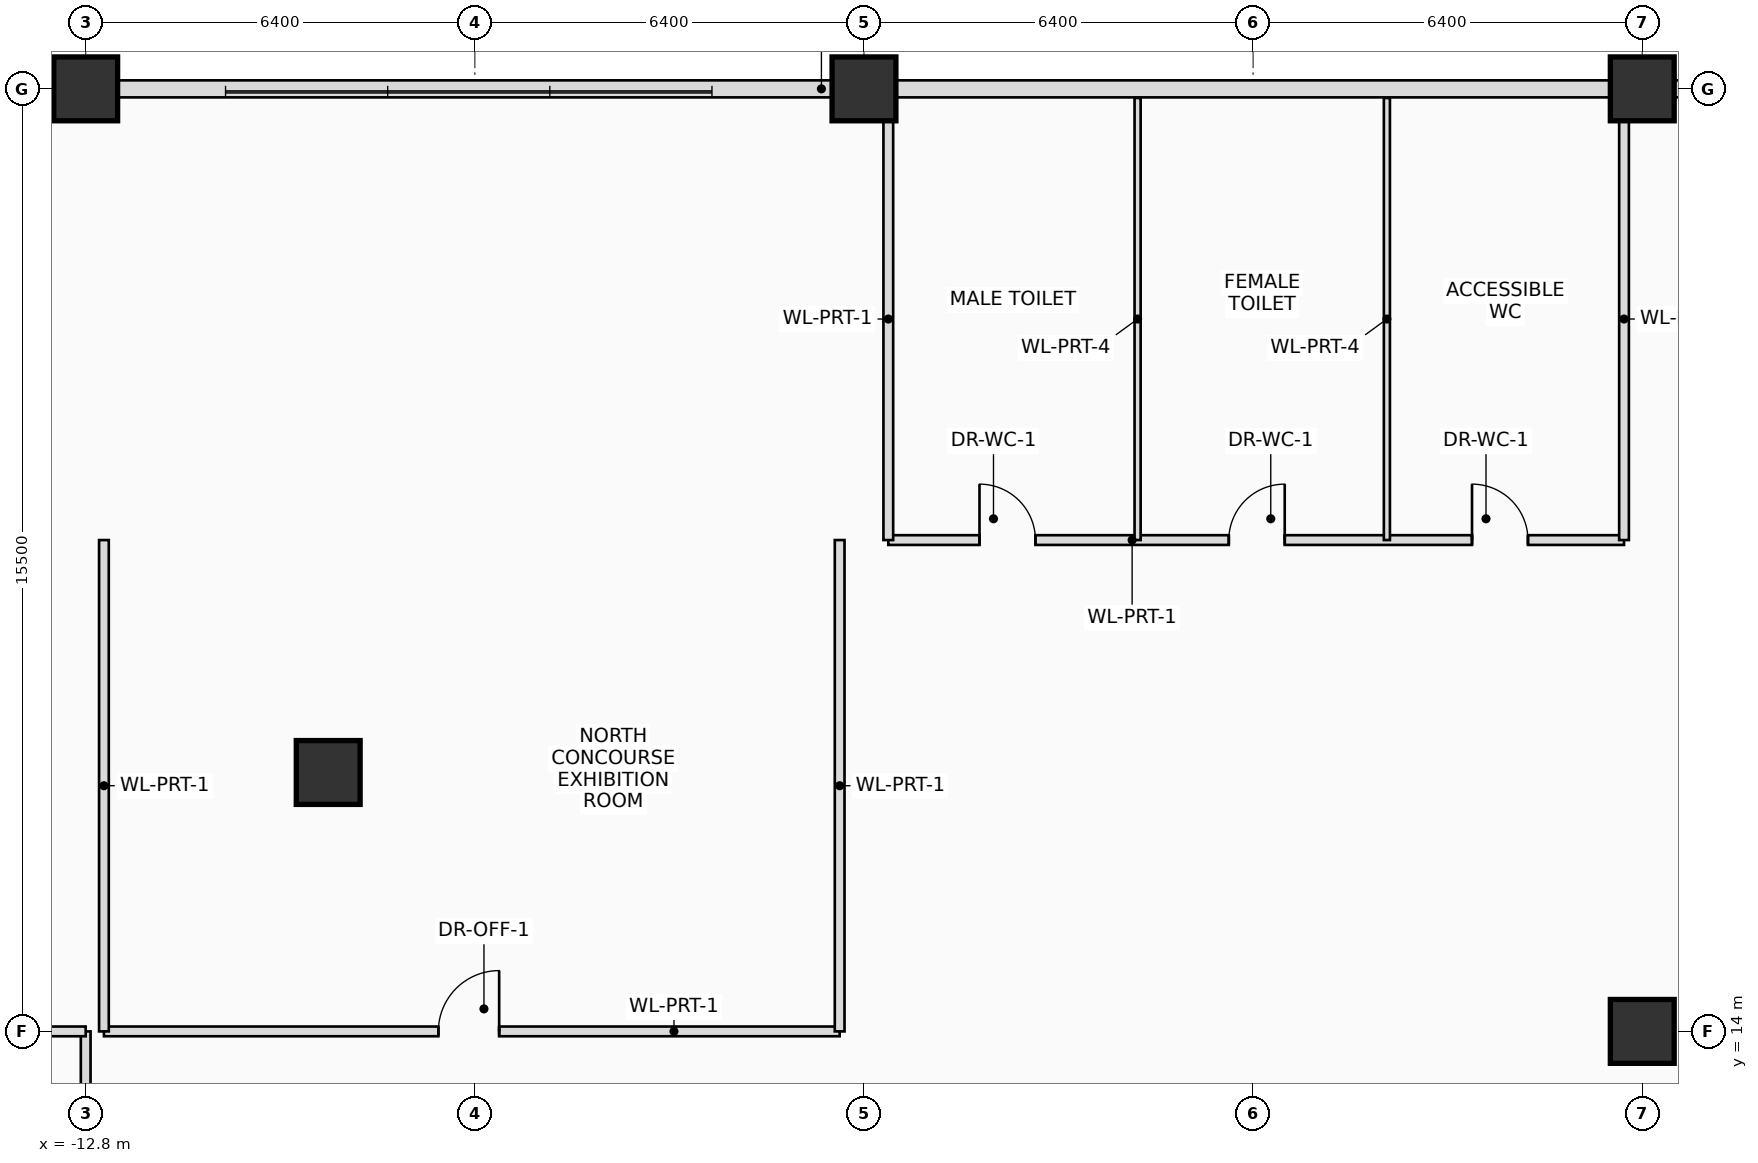
"""IFC4 building model, lengths in metres.
Left out: names, types, materials, properties, quantities, classifications, styles, units other than length and angle.
Written with IfcOpenShell. Run it as: python <this file> out.ifc"""

import sys

from ifc_helpers import new_model, si_unit, direction, frame, frame_2d, origin, origin_2d, place, context, subcontext, project, spatial, rectangle, extrude, source, transform, mapped, element, fill, save


model = new_model("IFC4")
c1 = context("Model", 3, precision=1e-05, world=origin(), true_north=direction((0.0, 1.0)))
c2 = subcontext(c1, "Body", "Model", "MODEL_VIEW")
j1 = project(units=[si_unit("LENGTHUNIT", "METRE"), si_unit("PLANEANGLEUNIT", "RADIAN")], contexts=[c1])
p1 = place(None, origin())
s1 = spatial("IfcSite", under=j1, at=p1, CompositionType="ELEMENT")
p2 = place(p1, origin())
s2 = spatial("IfcBuilding", under=s1, at=p2, CompositionType="ELEMENT")
p3 = place(p2, frame((0.0, 0.0, 12.3)))
s3 = spatial("IfcBuildingStorey", under=s2, at=p3, CompositionType="ELEMENT", Elevation=12.3)
m1 = source(origin(), c2, "Body", "SweptSolid", [
    extrude(rectangle(XDim=1.05, YDim=1.05, at=origin_2d()), origin(), (0.0, 0.0, 1.0), 3.9),
])
for number, where, z_axis, x_axis in (
    (1, (12.8, 14.0, 0.0), (0.0, 0.0, 1.0), (1.0, 0.0, 0.0)),
    (2, (-12.8, 29.5, 0.0), (0.0, 0.0, 1.0), (1.0, 0.0, 0.0)),
    (3, (0.0, 29.5, 0.0), (0.0, 0.0, 1.0), (1.0, 0.0, 0.0)),
    (4, (12.8, 29.5, 0.0), (0.0, 0.0, 1.0), (1.0, 0.0, 0.0)),
    (5, (-8.812, 18.258, 0.0), (0.0, 0.0, 1.0), (1.0, 0.0, 0.0)),
):
    element("IfcColumn", number, at=place(p3, frame(where, z_axis=z_axis, x_axis=x_axis)), inside=s3, PredefinedType="COLUMN", context=c2, shape_type="MappedRepresentation", body=[
        mapped(m1, transform((0.0, 0.0, 0.0), scale=1.0)),
    ])
p4 = place(p3, frame((-34.0, 29.5, 0.0), z_axis=(0.0, 0.0, 1.0), x_axis=(1.0, 0.0, 0.0)))
e6 = element("IfcWall", 6, at=p4, inside=s3, PredefinedType="SOLIDWALL", context=c2, shape_type="SweptSolid", body=[
    extrude(rectangle(XDim=68.0, YDim=0.28, at=frame_2d((34.0, 0.0))), origin(), (0.0, 0.0, 1.0), 2.65),
])
p5 = place(p4, frame((15.8, 0.0, 0.65)))
e7 = element("IfcOpeningElement", 7, at=p5, cuts=e6, PredefinedType="OPENING", context=c2, shape_type="SweptSolid", body=[
    extrude(rectangle(XDim=1.8, YDim=1.8, at=frame_2d((0.9, 0.9))), frame((0.0, 0.15, 0.0), z_axis=(0.0, -1.0, 0.0), x_axis=(1.0, 0.0, 0.0)), (0.0, 0.0, 1.0), 0.3),
])
p6 = place(p4, frame((49.0, 0.0, 0.65)))
e8 = element("IfcOpeningElement", 8, at=p6, cuts=e6, PredefinedType="OPENING", context=c2, shape_type="SweptSolid", body=[
    extrude(rectangle(XDim=1.8, YDim=1.8, at=frame_2d((0.9, 0.9))), frame((0.0, 0.15, 0.0), z_axis=(0.0, -1.0, 0.0), x_axis=(1.0, 0.0, 0.0)), (0.0, 0.0, 1.0), 0.3),
])
p7 = place(p3, frame((0.4, 22.08, 0.0), z_axis=(0.0, 0.0, 1.0), x_axis=(1.0, 0.0, 0.0)))
e9 = element("IfcWall", 9, at=p7, inside=s3, PredefinedType="PARTITIONING", context=c2, shape_type="SweptSolid", body=[
    extrude(rectangle(XDim=12.1, YDim=0.16, at=frame_2d((6.05, 0.0))), origin(), (0.0, 0.0, 1.0), 3.57),
])
p8 = place(p7, frame((1.5, 0.0, 0.0)))
e10 = element("IfcOpeningElement", 10, at=p8, cuts=e9, PredefinedType="OPENING", context=c2, shape_type="SweptSolid", body=[
    extrude(rectangle(XDim=0.92, YDim=2.1, at=frame_2d((0.46, 1.05))), frame((0.0, 0.09, 0.0), z_axis=(0.0, -1.0, 0.0), x_axis=(1.0, 0.0, 0.0)), (0.0, 0.0, 1.0), 0.18),
])
p9 = place(p7, frame((5.6, 0.0, 0.0)))
e11 = element("IfcOpeningElement", 11, at=p9, cuts=e9, PredefinedType="OPENING", context=c2, shape_type="SweptSolid", body=[
    extrude(rectangle(XDim=0.92, YDim=2.1, at=frame_2d((0.46, 1.05))), frame((0.0, 0.09, 0.0), z_axis=(0.0, -1.0, 0.0), x_axis=(1.0, 0.0, 0.0)), (0.0, 0.0, 1.0), 0.18),
])
p10 = place(p7, frame((9.6, 0.0, 0.0)))
e12 = element("IfcOpeningElement", 12, at=p10, cuts=e9, PredefinedType="OPENING", context=c2, shape_type="SweptSolid", body=[
    extrude(rectangle(XDim=0.92, YDim=2.1, at=frame_2d((0.46, 1.05))), frame((0.0, 0.09, 0.0), z_axis=(0.0, -1.0, 0.0), x_axis=(1.0, 0.0, 0.0)), (0.0, 0.0, 1.0), 0.18),
])
p11 = place(p3, frame((0.4, 22.08, 0.0), z_axis=(0.0, 0.0, 1.0), x_axis=(0.0, 1.0, 0.0)))
e13 = element("IfcWall", 13, at=p11, inside=s3, PredefinedType="PARTITIONING", context=c2, shape_type="SweptSolid", body=[
    extrude(rectangle(XDim=7.27, YDim=0.16, at=frame_2d((3.635, 0.0))), origin(), (0.0, 0.0, 1.0), 3.57),
])
for number, where, z_axis, x_axis in (
    (14, (4.5, 22.08, 0.0), (0.0, 0.0, 1.0), (0.0, 1.0, 0.0)),
    (15, (8.6, 22.08, 0.0), (0.0, 0.0, 1.0), (0.0, 1.0, 0.0)),
):
    element("IfcWall", number, at=place(p3, frame(where, z_axis=z_axis, x_axis=x_axis)), inside=s3, PredefinedType="PARTITIONING", context=c2, shape_type="SweptSolid", body=[
        extrude(rectangle(XDim=7.27, YDim=0.1, at=frame_2d((3.635, 0.0))), origin(), (0.0, 0.0, 1.0), 3.57),
    ])
p12 = place(p3, frame((12.5, 22.08, 0.0), z_axis=(0.0, 0.0, 1.0), x_axis=(0.0, 1.0, 0.0)))
e16 = element("IfcWall", 16, at=p12, inside=s3, PredefinedType="PARTITIONING", context=c2, shape_type="SweptSolid", body=[
    extrude(rectangle(XDim=7.27, YDim=0.16, at=frame_2d((3.635, 0.0))), origin(), (0.0, 0.0, 1.0), 3.57),
])
p13 = place(p3, frame((-12.8, -27.35, 0.0), z_axis=(0.0, 0.0, 1.0), x_axis=(0.0, 1.0, 0.0)))
e17 = element("IfcWall", 17, at=p13, inside=s3, PredefinedType="PARTITIONING", context=c2, shape_type="SweptSolid", body=[
    extrude(rectangle(XDim=41.35, YDim=0.16, at=frame_2d((20.675, 0.0))), origin(), (0.0, 0.0, 1.0), 2.775),
])
p14 = place(p13, frame((8.4, 0.0, 0.0)))
e18 = element("IfcOpeningElement", 18, at=p14, cuts=e17, PredefinedType="OPENING", context=c2, shape_type="SweptSolid", body=[
    extrude(rectangle(XDim=1.0, YDim=2.25, at=frame_2d((0.5, 1.125))), frame((0.0, 0.09, 0.0), z_axis=(0.0, -1.0, 0.0), x_axis=(1.0, 0.0, 0.0)), (0.0, 0.0, 1.0), 0.18),
])
p15 = place(p3, frame((-33.8, 14.0, 0.0), z_axis=(0.0, 0.0, 1.0), x_axis=(1.0, 0.0, 0.0)))
e19 = element("IfcWall", 19, at=p15, inside=s3, PredefinedType="PARTITIONING", context=c2, shape_type="SweptSolid", body=[
    extrude(rectangle(XDim=21.0, YDim=0.16, at=frame_2d((10.5, 0.0))), origin(), (0.0, 0.0, 1.0), 2.775),
])
p16 = place(p15, frame((15.5, 0.0, 0.0)))
e20 = element("IfcOpeningElement", 20, at=p16, cuts=e19, PredefinedType="OPENING", context=c2, shape_type="SweptSolid", body=[
    extrude(rectangle(XDim=1.0, YDim=2.25, at=frame_2d((0.5, 1.125))), frame((0.0, 0.09, 0.0), z_axis=(0.0, -1.0, 0.0), x_axis=(1.0, 0.0, 0.0)), (0.0, 0.0, 1.0), 0.18),
])
p17 = place(p3, frame((-12.5, 14.0, 0.0), z_axis=(0.0, 0.0, 1.0), x_axis=(1.0, 0.0, 0.0)))
e21 = element("IfcWall", 21, at=p17, inside=s3, PredefinedType="PARTITIONING", context=c2, shape_type="SweptSolid", body=[
    extrude(rectangle(XDim=12.1, YDim=0.16, at=frame_2d((6.05, 0.0))), origin(), (0.0, 0.0, 1.0), 3.57),
])
p18 = place(p17, frame((5.5, 0.0, 0.0)))
e22 = element("IfcOpeningElement", 22, at=p18, cuts=e21, PredefinedType="OPENING", context=c2, shape_type="SweptSolid", body=[
    extrude(rectangle(XDim=1.0, YDim=2.25, at=frame_2d((0.5, 1.125))), frame((0.0, 0.09, 0.0), z_axis=(0.0, -1.0, 0.0), x_axis=(1.0, 0.0, 0.0)), (0.0, 0.0, 1.0), 0.18),
])
for number, where, z_axis, x_axis in (
    (23, (-12.5, 14.0, 0.0), (0.0, 0.0, 1.0), (0.0, 1.0, 0.0)),
    (24, (-0.4, 14.0, 0.0), (0.0, 0.0, 1.0), (0.0, 1.0, 0.0)),
):
    element("IfcWall", number, at=place(p3, frame(where, z_axis=z_axis, x_axis=x_axis)), inside=s3, PredefinedType="PARTITIONING", context=c2, shape_type="SweptSolid", body=[
        extrude(rectangle(XDim=8.08, YDim=0.16, at=frame_2d((4.04, 0.0))), origin(), (0.0, 0.0, 1.0), 3.57),
    ])
p19 = place(p8, origin())
e25 = element("IfcDoor", 25, at=p19, inside=s3, OperationType="SINGLE_SWING_LEFT", PredefinedType="DOOR", context=c2, shape_type="SweptSolid", body=[
    extrude(rectangle(XDim=0.92, YDim=2.1, at=frame_2d((0.46, 1.05))), frame((0.0, 0.025, 0.0), z_axis=(0.0, -1.0, 0.0), x_axis=(1.0, 0.0, 0.0)), (0.0, 0.0, 1.0), 0.05),
])
fill(e10, e25)
p20 = place(p9, origin())
e26 = element("IfcDoor", 26, at=p20, inside=s3, OperationType="SINGLE_SWING_RIGHT", PredefinedType="DOOR", context=c2, shape_type="SweptSolid", body=[
    extrude(rectangle(XDim=0.92, YDim=2.1, at=frame_2d((0.46, 1.05))), frame((0.0, 0.025, 0.0), z_axis=(0.0, -1.0, 0.0), x_axis=(1.0, 0.0, 0.0)), (0.0, 0.0, 1.0), 0.05),
])
fill(e11, e26)
p21 = place(p10, origin())
e27 = element("IfcDoor", 27, at=p21, inside=s3, OperationType="SINGLE_SWING_LEFT", PredefinedType="DOOR", context=c2, shape_type="SweptSolid", body=[
    extrude(rectangle(XDim=0.92, YDim=2.1, at=frame_2d((0.46, 1.05))), frame((0.0, 0.025, 0.0), z_axis=(0.0, -1.0, 0.0), x_axis=(1.0, 0.0, 0.0)), (0.0, 0.0, 1.0), 0.05),
])
fill(e12, e27)
p22 = place(p18, origin())
e28 = element("IfcDoor", 28, at=p22, inside=s3, OperationType="SINGLE_SWING_RIGHT", PredefinedType="DOOR", context=c2, shape_type="SweptSolid", body=[
    extrude(rectangle(XDim=1.0, YDim=2.25, at=frame_2d((0.5, 1.125))), frame((0.0, 0.025, 0.0), z_axis=(0.0, -1.0, 0.0), x_axis=(1.0, 0.0, 0.0)), (0.0, 0.0, 1.0), 0.05),
])
fill(e22, e28)
save(model, sys.argv[1])
